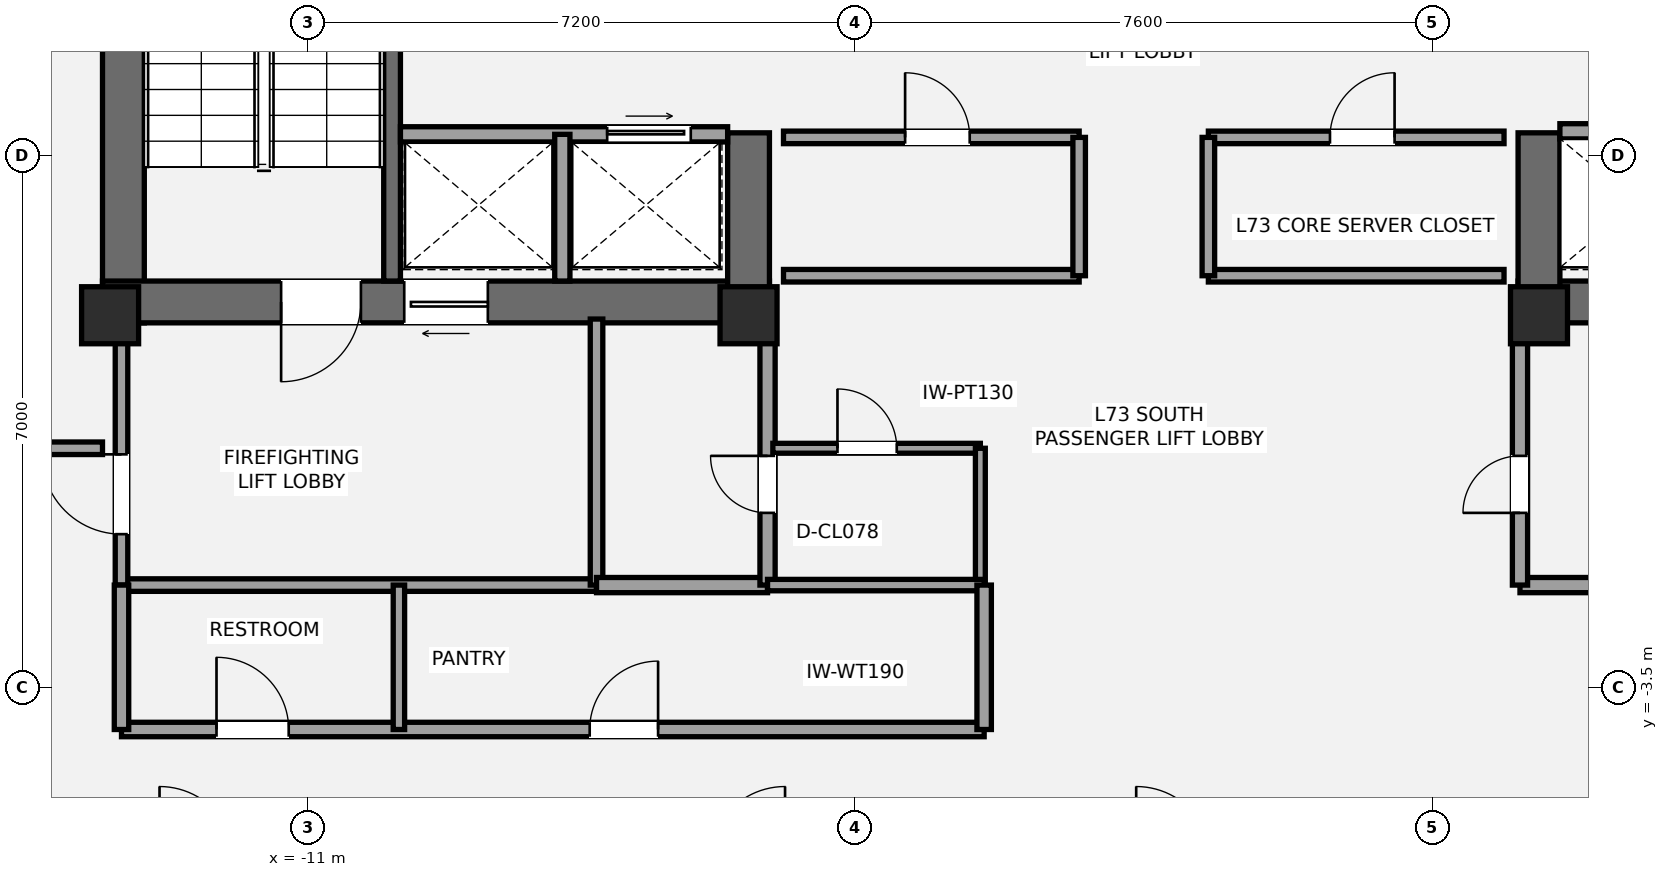
"""IFC4 building model, lengths in metres.
Left out: names, types, materials, properties, quantities, classifications, styles, units other than length and angle.
Written with IfcOpenShell. Run it as: python <this file> out.ifc"""

import sys

from ifc_helpers import new_model, si_unit, direction, frame, frame_2d, origin, origin_2d, place, context, subcontext, project, spatial, rectangle, extrude, element, fill, save


model = new_model("IFC4")
c1 = context("Model", 3, precision=1e-05, world=origin(), true_north=direction((0.0, 1.0)))
c2 = subcontext(c1, "Body", "Model", "MODEL_VIEW")
j1 = project(units=[si_unit("LENGTHUNIT", "METRE"), si_unit("PLANEANGLEUNIT", "RADIAN")], contexts=[c1])
p1 = place(None, origin())
s1 = spatial("IfcSite", under=j1, at=p1, CompositionType="ELEMENT")
p2 = place(p1, origin())
s2 = spatial("IfcBuilding", under=s1, at=p2, CompositionType="ELEMENT")
p3 = place(p2, frame((0.0, 0.0, 257.25)))
s3 = spatial("IfcBuildingStorey", under=s2, at=p3, CompositionType="ELEMENT", Elevation=257.25)
p4 = place(p3, frame((-13.425, 1.3, 0.0), z_axis=(0.0, 0.0, 1.0), x_axis=(0.0, 1.0, 0.0)))
e1 = element("IfcWall", 1, at=p4, inside=s3, PredefinedType="SHEAR", context=c2, shape_type="SweptSolid", body=[
    extrude(rectangle(XDim=8.25, YDim=0.55, at=frame_2d((4.125, 0.0))), origin(), (0.0, 0.0, 1.0), 3.15),
])
p5 = place(p3, frame((-4.925, 1.575, 0.0), z_axis=(0.0, 0.0, 1.0), x_axis=(-1.0, 0.0, 0.0)))
e2 = element("IfcWall", 2, at=p5, inside=s3, PredefinedType="SHEAR", context=c2, shape_type="SweptSolid", body=[
    extrude(rectangle(XDim=8.775, YDim=0.55, at=frame_2d((4.387, 0.0))), origin(), (0.0, 0.0, 1.0), 3.15),
])
p6 = place(p5, frame((5.375, 0.0, 0.0)))
e3 = element("IfcOpeningElement", 3, at=p6, cuts=e2, PredefinedType="OPENING", context=c2, shape_type="SweptSolid", body=[
    extrude(rectangle(XDim=1.05, YDim=2.15, at=frame_2d((0.525, 1.075))), frame((0.0, 0.285, 0.0), z_axis=(0.0, -1.0, 0.0), x_axis=(1.0, 0.0, 0.0)), (0.0, 0.0, 1.0), 0.57),
])
p7 = place(p5, frame((3.705, 0.0, 0.0)))
e4 = element("IfcOpeningElement", 4, at=p7, cuts=e2, PredefinedType="OPENING", context=c2, shape_type="SweptSolid", body=[
    extrude(rectangle(XDim=1.1, YDim=2.2, at=frame_2d((0.55, 1.1))), frame((0.0, 0.285, 0.0), z_axis=(0.0, -1.0, 0.0), x_axis=(1.0, 0.0, 0.0)), (0.0, 0.0, 1.0), 0.57),
])
p8 = place(p3, frame((-5.2, 1.3, 0.0), z_axis=(0.0, 0.0, 1.0), x_axis=(0.0, 1.0, 0.0)))
e5 = element("IfcWall", 5, at=p8, inside=s3, PredefinedType="SHEAR", context=c2, shape_type="SweptSolid", body=[
    extrude(rectangle(XDim=2.5, YDim=0.55, at=frame_2d((1.25, 0.0))), origin(), (0.0, 0.0, 1.0), 3.15),
])
p9 = place(p3, frame((-9.89, 1.85, 0.0), z_axis=(0.0, 0.0, 1.0), x_axis=(0.0, 1.0, 0.0)))
e6 = element("IfcWall", 6, at=p9, inside=s3, PredefinedType="SHEAR", context=c2, shape_type="SweptSolid", body=[
    extrude(rectangle(XDim=7.15, YDim=0.22, at=frame_2d((3.575, 0.0))), origin(), (0.0, 0.0, 1.0), 3.15),
])
p10 = place(p3, frame((13.7, 1.575, 0.0), z_axis=(0.0, 0.0, 1.0), x_axis=(-1.0, 0.0, 0.0)))
e7 = element("IfcWall", 7, at=p10, inside=s3, PredefinedType="SHEAR", context=c2, shape_type="SweptSolid", body=[
    extrude(rectangle(XDim=8.775, YDim=0.55, at=frame_2d((4.387, 0.0))), origin(), (0.0, 0.0, 1.0), 3.15),
])
p11 = place(p10, frame((2.35, 0.0, 0.0)))
e8 = element("IfcOpeningElement", 8, at=p11, cuts=e7, PredefinedType="OPENING", context=c2, shape_type="SweptSolid", body=[
    extrude(rectangle(XDim=1.05, YDim=2.15, at=frame_2d((0.525, 1.075))), frame((0.0, 0.285, 0.0), z_axis=(0.0, -1.0, 0.0), x_axis=(1.0, 0.0, 0.0)), (0.0, 0.0, 1.0), 0.57),
])
p12 = place(p10, frame((4.35, 0.0, 0.0)))
e9 = element("IfcOpeningElement", 9, at=p12, cuts=e7, PredefinedType="OPENING", context=c2, shape_type="SweptSolid", body=[
    extrude(rectangle(XDim=1.1, YDim=2.2, at=frame_2d((0.55, 1.1))), frame((0.0, 0.285, 0.0), z_axis=(0.0, -1.0, 0.0), x_axis=(1.0, 0.0, 0.0)), (0.0, 0.0, 1.0), 0.57),
])
p13 = place(p3, frame((5.2, 1.3, 0.0), z_axis=(0.0, 0.0, 1.0), x_axis=(0.0, 1.0, 0.0)))
e10 = element("IfcWall", 10, at=p13, inside=s3, PredefinedType="SHEAR", context=c2, shape_type="SweptSolid", body=[
    extrude(rectangle(XDim=2.5, YDim=0.55, at=frame_2d((1.25, 0.0))), origin(), (0.0, 0.0, 1.0), 3.15),
])
for number, where, z_axis, x_axis in (
    (11, (-13.6, 1.4, 0.0), (0.0, 0.0, 1.0), (1.0, 0.0, 0.0)),
    (12, (-5.2, 1.4, 0.0), (0.0, 0.0, 1.0), (1.0, 0.0, 0.0)),
    (13, (5.2, 1.4, 0.0), (0.0, 0.0, 1.0), (1.0, 0.0, 0.0)),
):
    element("IfcColumn", number, at=place(p3, frame(where, z_axis=z_axis, x_axis=x_axis)), inside=s3, PredefinedType="PILASTER", context=c2, shape_type="SweptSolid", body=[
        extrude(rectangle(XDim=0.75, YDim=0.75, at=origin_2d()), origin(), (0.0, 0.0, 1.0), 3.15),
    ])
p14 = place(p3, frame((-13.45, -2.15, 0.0), z_axis=(0.0, 0.0, 1.0), x_axis=(1.0, 0.0, 0.0)))
e14 = element("IfcWall", 14, at=p14, inside=s3, PredefinedType="PARTITIONING", context=c2, shape_type="SweptSolid", body=[
    extrude(rectangle(XDim=6.25, YDim=0.165, at=frame_2d((3.125, 0.0))), origin(), (0.0, 0.0, 1.0), 2.383),
])
p15 = place(p3, frame((-13.45, -2.15, 0.0), z_axis=(0.0, 0.0, 1.0), x_axis=(0.0, 1.0, 0.0)))
e15 = element("IfcWall", 15, at=p15, inside=s3, PredefinedType="PARTITIONING", context=c2, shape_type="SweptSolid", body=[
    extrude(rectangle(XDim=3.5, YDim=0.165, at=frame_2d((1.75, 0.0))), origin(), (0.0, 0.0, 1.0), 2.383),
])
p16 = place(p15, frame((0.67, 0.0, 0.0)))
e16 = element("IfcOpeningElement", 16, at=p16, cuts=e15, PredefinedType="OPENING", context=c2, shape_type="SweptSolid", body=[
    extrude(rectangle(XDim=1.05, YDim=2.15, at=frame_2d((0.525, 1.075))), frame((0.0, 0.093, 0.0), z_axis=(0.0, -1.0, 0.0), x_axis=(1.0, 0.0, 0.0)), (0.0, 0.0, 1.0), 0.185),
])
p17 = place(p3, frame((-7.2, -2.15, 0.0), z_axis=(0.0, 0.0, 1.0), x_axis=(0.0, 1.0, 0.0)))
e17 = element("IfcWall", 17, at=p17, inside=s3, PredefinedType="PARTITIONING", context=c2, shape_type="SweptSolid", body=[
    extrude(rectangle(XDim=3.5, YDim=0.165, at=frame_2d((1.75, 0.0))), origin(), (0.0, 0.0, 1.0), 2.383),
])
p18 = place(p3, frame((-7.2, -2.15, 0.0), z_axis=(0.0, 0.0, 1.0), x_axis=(1.0, 0.0, 0.0)))
e18 = element("IfcWall", 18, at=p18, inside=s3, PredefinedType="SOLIDWALL", context=c2, shape_type="SweptSolid", body=[
    extrude(rectangle(XDim=2.25, YDim=0.2, at=frame_2d((1.125, 0.0))), origin(), (0.0, 0.0, 1.0), 2.93),
])
p19 = place(p3, frame((-4.95, -2.15, 0.0), z_axis=(0.0, 0.0, 1.0), x_axis=(0.0, 1.0, 0.0)))
e19 = element("IfcWall", 19, at=p19, inside=s3, PredefinedType="SOLIDWALL", context=c2, shape_type="SweptSolid", body=[
    extrude(rectangle(XDim=3.5, YDim=0.2, at=frame_2d((1.75, 0.0))), origin(), (0.0, 0.0, 1.0), 2.383),
])
p20 = place(p19, frame((0.95, 0.0, 0.0)))
e20 = element("IfcOpeningElement", 20, at=p20, cuts=e19, PredefinedType="OPENING", context=c2, shape_type="SweptSolid", body=[
    extrude(rectangle(XDim=0.75, YDim=2.1, at=frame_2d((0.375, 1.05))), frame((0.0, 0.11, 0.0), z_axis=(0.0, -1.0, 0.0), x_axis=(1.0, 0.0, 0.0)), (0.0, 0.0, 1.0), 0.22),
])
p21 = place(p3, frame((4.95, -2.15, 0.0), z_axis=(0.0, 0.0, 1.0), x_axis=(1.0, 0.0, 0.0)))
e21 = element("IfcWall", 21, at=p21, inside=s3, PredefinedType="SOLIDWALL", context=c2, shape_type="SweptSolid", body=[
    extrude(rectangle(XDim=2.25, YDim=0.2, at=frame_2d((1.125, 0.0))), origin(), (0.0, 0.0, 1.0), 2.93),
])
p22 = place(p3, frame((4.95, -2.15, 0.0), z_axis=(0.0, 0.0, 1.0), x_axis=(0.0, 1.0, 0.0)))
e22 = element("IfcWall", 22, at=p22, inside=s3, PredefinedType="SOLIDWALL", context=c2, shape_type="SweptSolid", body=[
    extrude(rectangle(XDim=3.5, YDim=0.2, at=frame_2d((1.75, 0.0))), origin(), (0.0, 0.0, 1.0), 2.383),
])
p23 = place(p22, frame((0.95, 0.0, 0.0)))
e23 = element("IfcOpeningElement", 23, at=p23, cuts=e22, PredefinedType="OPENING", context=c2, shape_type="SweptSolid", body=[
    extrude(rectangle(XDim=0.75, YDim=2.1, at=frame_2d((0.375, 1.05))), frame((0.0, 0.11, 0.0), z_axis=(0.0, -1.0, 0.0), x_axis=(1.0, 0.0, 0.0)), (0.0, 0.0, 1.0), 0.22),
])
p24 = place(p3, frame((-4.88, -0.35, 0.0), z_axis=(0.0, 0.0, 1.0), x_axis=(1.0, 0.0, 0.0)))
e24 = element("IfcWall", 24, at=p24, inside=s3, PredefinedType="PARTITIONING", context=c2, shape_type="SweptSolid", body=[
    extrude(rectangle(XDim=2.73, YDim=0.13, at=frame_2d((1.365, 0.0))), origin(), (0.0, 0.0, 1.0), 2.383),
])
p25 = place(p24, frame((0.85, 0.0, 0.0)))
e25 = element("IfcOpeningElement", 25, at=p25, cuts=e24, PredefinedType="OPENING", context=c2, shape_type="SweptSolid", body=[
    extrude(rectangle(XDim=0.78, YDim=2.1, at=frame_2d((0.39, 1.05))), frame((0.0, 0.075, 0.0), z_axis=(0.0, -1.0, 0.0), x_axis=(1.0, 0.0, 0.0)), (0.0, 0.0, 1.0), 0.15),
])
p26 = place(p3, frame((-2.15, -2.15, 0.0), z_axis=(0.0, 0.0, 1.0), x_axis=(0.0, 1.0, 0.0)))
e26 = element("IfcWall", 26, at=p26, inside=s3, PredefinedType="PARTITIONING", context=c2, shape_type="SweptSolid", body=[
    extrude(rectangle(XDim=1.8, YDim=0.13, at=frame_2d((0.9, 0.0))), origin(), (0.0, 0.0, 1.0), 2.93),
])
p27 = place(p3, frame((-9.78, 3.78, 0.0), z_axis=(0.0, 0.0, 1.0), x_axis=(1.0, 0.0, 0.0)))
e27 = element("IfcWall", 27, at=p27, inside=s3, PredefinedType="SOLIDWALL", context=c2, shape_type="SweptSolid", body=[
    extrude(rectangle(XDim=4.305, YDim=0.2, at=frame_2d((2.152, 0.0))), origin(), (0.0, 0.0, 1.0), 2.93),
])
p28 = place(p27, frame((2.72, 0.0, 0.0)))
e28 = element("IfcOpeningElement", 28, at=p28, cuts=e27, PredefinedType="OPENING", context=c2, shape_type="SweptSolid", body=[
    extrude(rectangle(XDim=1.1, YDim=2.2, at=frame_2d((0.55, 1.1))), frame((0.0, 0.11, 0.0), z_axis=(0.0, -1.0, 0.0), x_axis=(1.0, 0.0, 0.0)), (0.0, 0.0, 1.0), 0.22),
])
p29 = place(p3, frame((-7.65, 1.85, 0.0), z_axis=(0.0, 0.0, 1.0), x_axis=(0.0, 1.0, 0.0)))
e29 = element("IfcWall", 29, at=p29, inside=s3, PredefinedType="SOLIDWALL", context=c2, shape_type="SweptSolid", body=[
    extrude(rectangle(XDim=1.93, YDim=0.2, at=frame_2d((0.965, 0.0))), origin(), (0.0, 0.0, 1.0), 2.93),
])
p30 = place(p3, frame((5.475, 3.82, 0.0), z_axis=(0.0, 0.0, 1.0), x_axis=(1.0, 0.0, 0.0)))
e30 = element("IfcWall", 30, at=p30, inside=s3, PredefinedType="SOLIDWALL", context=c2, shape_type="SweptSolid", body=[
    extrude(rectangle(XDim=4.305, YDim=0.2, at=frame_2d((2.152, 0.0))), origin(), (0.0, 0.0, 1.0), 2.93),
])
p31 = place(p30, frame((0.65, 0.0, 0.0)))
e31 = element("IfcOpeningElement", 31, at=p31, cuts=e30, PredefinedType="OPENING", context=c2, shape_type="SweptSolid", body=[
    extrude(rectangle(XDim=1.2, YDim=2.2, at=frame_2d((0.6, 1.1))), frame((0.0, 0.11, 0.0), z_axis=(0.0, -1.0, 0.0), x_axis=(1.0, 0.0, 0.0)), (0.0, 0.0, 1.0), 0.22),
])
p32 = place(p3, frame((-4.74, 1.92, 0.0), z_axis=(0.0, 0.0, 1.0), x_axis=(1.0, 0.0, 0.0)))
e32 = element("IfcWall", 32, at=p32, inside=s3, PredefinedType="PARTITIONING", context=c2, shape_type="SweptSolid", body=[
    extrude(rectangle(XDim=3.89, YDim=0.165, at=frame_2d((1.945, 0.0))), origin(), (0.0, 0.0, 1.0), 2.07),
])
p33 = place(p3, frame((-4.74, 3.74, 0.0), z_axis=(0.0, 0.0, 1.0), x_axis=(1.0, 0.0, 0.0)))
e33 = element("IfcWall", 33, at=p33, inside=s3, PredefinedType="PARTITIONING", context=c2, shape_type="SweptSolid", body=[
    extrude(rectangle(XDim=3.89, YDim=0.165, at=frame_2d((1.945, 0.0))), origin(), (0.0, 0.0, 1.0), 2.93),
])
p34 = place(p33, frame((1.6, 0.0, 0.0)))
e34 = element("IfcOpeningElement", 34, at=p34, cuts=e33, PredefinedType="OPENING", context=c2, shape_type="SweptSolid", body=[
    extrude(rectangle(XDim=0.85, YDim=2.1, at=frame_2d((0.425, 1.05))), frame((0.0, 0.093, 0.0), z_axis=(0.0, -1.0, 0.0), x_axis=(1.0, 0.0, 0.0)), (0.0, 0.0, 1.0), 0.185),
])
p35 = place(p3, frame((-0.85, 1.92, 0.0), z_axis=(0.0, 0.0, 1.0), x_axis=(0.0, 1.0, 0.0)))
e35 = element("IfcWall", 35, at=p35, inside=s3, PredefinedType="PARTITIONING", context=c2, shape_type="SweptSolid", body=[
    extrude(rectangle(XDim=1.82, YDim=0.165, at=frame_2d((0.91, 0.0))), origin(), (0.0, 0.0, 1.0), 2.93),
])
p36 = place(p3, frame((0.85, 1.92, 0.0), z_axis=(0.0, 0.0, 1.0), x_axis=(1.0, 0.0, 0.0)))
e36 = element("IfcWall", 36, at=p36, inside=s3, PredefinedType="PARTITIONING", context=c2, shape_type="SweptSolid", body=[
    extrude(rectangle(XDim=3.89, YDim=0.165, at=frame_2d((1.945, 0.0))), origin(), (0.0, 0.0, 1.0), 2.07),
])
p37 = place(p3, frame((0.85, 3.74, 0.0), z_axis=(0.0, 0.0, 1.0), x_axis=(1.0, 0.0, 0.0)))
e37 = element("IfcWall", 37, at=p37, inside=s3, PredefinedType="PARTITIONING", context=c2, shape_type="SweptSolid", body=[
    extrude(rectangle(XDim=3.89, YDim=0.165, at=frame_2d((1.945, 0.0))), origin(), (0.0, 0.0, 1.0), 2.93),
])
p38 = place(p37, frame((1.6, 0.0, 0.0)))
e38 = element("IfcOpeningElement", 38, at=p38, cuts=e37, PredefinedType="OPENING", context=c2, shape_type="SweptSolid", body=[
    extrude(rectangle(XDim=0.85, YDim=2.1, at=frame_2d((0.425, 1.05))), frame((0.0, 0.093, 0.0), z_axis=(0.0, -1.0, 0.0), x_axis=(1.0, 0.0, 0.0)), (0.0, 0.0, 1.0), 0.185),
])
p39 = place(p3, frame((0.85, 1.92, 0.0), z_axis=(0.0, 0.0, 1.0), x_axis=(0.0, 1.0, 0.0)))
e39 = element("IfcWall", 39, at=p39, inside=s3, PredefinedType="PARTITIONING", context=c2, shape_type="SweptSolid", body=[
    extrude(rectangle(XDim=1.82, YDim=0.165, at=frame_2d((0.91, 0.0))), origin(), (0.0, 0.0, 1.0), 2.93),
])
p40 = place(p3, frame((-13.45, -4.05, 0.0), z_axis=(0.0, 0.0, 1.0), x_axis=(1.0, 0.0, 0.0)))
e40 = element("IfcWall", 40, at=p40, inside=s3, PredefinedType="PLUMBINGWALL", context=c2, shape_type="SweptSolid", body=[
    extrude(rectangle(XDim=11.35, YDim=0.19, at=frame_2d((5.675, 0.0))), origin(), (0.0, 0.0, 1.0), 2.317),
])
p41 = place(p40, frame((1.25, 0.0, 0.0)))
e41 = element("IfcOpeningElement", 41, at=p41, cuts=e40, PredefinedType="OPENING", context=c2, shape_type="SweptSolid", body=[
    extrude(rectangle(XDim=0.95, YDim=2.15, at=frame_2d((0.475, 1.075))), frame((0.0, 0.105, 0.0), z_axis=(0.0, -1.0, 0.0), x_axis=(1.0, 0.0, 0.0)), (0.0, 0.0, 1.0), 0.21),
])
p42 = place(p40, frame((6.16, 0.0, 0.0)))
e42 = element("IfcOpeningElement", 42, at=p42, cuts=e40, PredefinedType="OPENING", context=c2, shape_type="SweptSolid", body=[
    extrude(rectangle(XDim=0.9, YDim=2.1, at=frame_2d((0.45, 1.05))), frame((0.0, 0.105, 0.0), z_axis=(0.0, -1.0, 0.0), x_axis=(1.0, 0.0, 0.0)), (0.0, 0.0, 1.0), 0.21),
])
p43 = place(p3, frame((-4.95, -2.15, 0.0), z_axis=(0.0, 0.0, 1.0), x_axis=(1.0, 0.0, 0.0)))
e43 = element("IfcWall", 43, at=p43, inside=s3, PredefinedType="PLUMBINGWALL", context=c2, shape_type="SweptSolid", body=[
    extrude(rectangle(XDim=2.85, YDim=0.15, at=frame_2d((1.425, 0.0))), origin(), (0.0, 0.0, 1.0), 2.383),
])
for number, where, z_axis, x_axis in (
    (44, (-13.45, -4.05, 0.0), (0.0, 0.0, 1.0), (0.0, 1.0, 0.0)),
    (45, (-2.1, -4.05, 0.0), (0.0, 0.0, 1.0), (0.0, 1.0, 0.0)),
):
    element("IfcWall", number, at=place(p3, frame(where, z_axis=z_axis, x_axis=x_axis)), inside=s3, PredefinedType="PLUMBINGWALL", context=c2, shape_type="SweptSolid", body=[
        extrude(rectangle(XDim=1.9, YDim=0.19, at=frame_2d((0.95, 0.0))), origin(), (0.0, 0.0, 1.0), 2.383),
    ])
p44 = place(p3, frame((-9.8, -4.05, 0.0), z_axis=(0.0, 0.0, 1.0), x_axis=(0.0, 1.0, 0.0)))
e46 = element("IfcWall", 46, at=p44, inside=s3, PredefinedType="PLUMBINGWALL", context=c2, shape_type="SweptSolid", body=[
    extrude(rectangle(XDim=1.9, YDim=0.15, at=frame_2d((0.95, 0.0))), origin(), (0.0, 0.0, 1.0), 2.93),
])
p45 = place(p3, frame((-16.1, -0.35, 0.0), z_axis=(0.0, 0.0, 1.0), x_axis=(1.0, 0.0, 0.0)))
e47 = element("IfcWall", 47, at=p45, inside=s3, PredefinedType="PARTITIONING", context=c2, shape_type="SweptSolid", body=[
    extrude(rectangle(XDim=2.4, YDim=0.165, at=frame_2d((1.2, 0.0))), origin(), (0.0, 0.0, 1.0), 2.383),
])
p46 = place(p6, origin())
e48 = element("IfcDoor", 48, at=p46, inside=s3, OperationType="SINGLE_SWING_RIGHT", PredefinedType="DOOR", context=c2, shape_type="SweptSolid", body=[
    extrude(rectangle(XDim=1.05, YDim=2.15, at=frame_2d((0.525, 1.075))), frame((0.0, 0.025, 0.0), z_axis=(0.0, -1.0, 0.0), x_axis=(1.0, 0.0, 0.0)), (0.0, 0.0, 1.0), 0.05),
])
fill(e3, e48)
p47 = place(p16, origin())
e49 = element("IfcDoor", 49, at=p47, inside=s3, OperationType="SINGLE_SWING_RIGHT", PredefinedType="DOOR", context=c2, shape_type="SweptSolid", body=[
    extrude(rectangle(XDim=1.05, YDim=2.15, at=frame_2d((0.525, 1.075))), frame((0.0, 0.025, 0.0), z_axis=(0.0, -1.0, 0.0), x_axis=(1.0, 0.0, 0.0)), (0.0, 0.0, 1.0), 0.05),
])
fill(e16, e49)
p48 = place(p20, origin())
e50 = element("IfcDoor", 50, at=p48, inside=s3, OperationType="SINGLE_SWING_RIGHT", PredefinedType="DOOR", context=c2, shape_type="SweptSolid", body=[
    extrude(rectangle(XDim=0.75, YDim=2.1, at=frame_2d((0.375, 1.05))), frame((0.0, 0.025, 0.0), z_axis=(0.0, -1.0, 0.0), x_axis=(1.0, 0.0, 0.0)), (0.0, 0.0, 1.0), 0.05),
])
fill(e20, e50)
p49 = place(p23, origin())
e51 = element("IfcDoor", 51, at=p49, inside=s3, OperationType="SINGLE_SWING_LEFT", PredefinedType="DOOR", context=c2, shape_type="SweptSolid", body=[
    extrude(rectangle(XDim=0.75, YDim=2.1, at=frame_2d((0.375, 1.05))), frame((0.0, 0.025, 0.0), z_axis=(0.0, -1.0, 0.0), x_axis=(1.0, 0.0, 0.0)), (0.0, 0.0, 1.0), 0.05),
])
fill(e23, e51)
p50 = place(p25, origin())
e52 = element("IfcDoor", 52, at=p50, inside=s3, OperationType="SINGLE_SWING_LEFT", PredefinedType="DOOR", context=c2, shape_type="SweptSolid", body=[
    extrude(rectangle(XDim=0.78, YDim=2.1, at=frame_2d((0.39, 1.05))), frame((0.0, 0.025, 0.0), z_axis=(0.0, -1.0, 0.0), x_axis=(1.0, 0.0, 0.0)), (0.0, 0.0, 1.0), 0.05),
])
fill(e25, e52)
p51 = place(p7, origin())
e53 = element("IfcDoor", 53, at=p51, inside=s3, OperationType="SLIDING_TO_LEFT", PredefinedType="DOOR", context=c2, shape_type="SweptSolid", body=[
    extrude(rectangle(XDim=1.1, YDim=2.2, at=frame_2d((0.55, 1.1))), frame((0.0, 0.025, 0.0), z_axis=(0.0, -1.0, 0.0), x_axis=(1.0, 0.0, 0.0)), (0.0, 0.0, 1.0), 0.05),
])
fill(e4, e53)
p52 = place(p28, origin())
e54 = element("IfcDoor", 54, at=p52, inside=s3, OperationType="SLIDING_TO_LEFT", PredefinedType="DOOR", context=c2, shape_type="SweptSolid", body=[
    extrude(rectangle(XDim=1.1, YDim=2.2, at=frame_2d((0.55, 1.1))), frame((0.0, 0.025, 0.0), z_axis=(0.0, -1.0, 0.0), x_axis=(1.0, 0.0, 0.0)), (0.0, 0.0, 1.0), 0.05),
])
fill(e28, e54)
p53 = place(p34, origin())
e55 = element("IfcDoor", 55, at=p53, inside=s3, OperationType="SINGLE_SWING_LEFT", PredefinedType="DOOR", context=c2, shape_type="SweptSolid", body=[
    extrude(rectangle(XDim=0.85, YDim=2.1, at=frame_2d((0.425, 1.05))), frame((0.0, 0.025, 0.0), z_axis=(0.0, -1.0, 0.0), x_axis=(1.0, 0.0, 0.0)), (0.0, 0.0, 1.0), 0.05),
])
fill(e34, e55)
p54 = place(p38, origin())
e56 = element("IfcDoor", 56, at=p54, inside=s3, OperationType="SINGLE_SWING_RIGHT", PredefinedType="DOOR", context=c2, shape_type="SweptSolid", body=[
    extrude(rectangle(XDim=0.85, YDim=2.1, at=frame_2d((0.425, 1.05))), frame((0.0, 0.025, 0.0), z_axis=(0.0, -1.0, 0.0), x_axis=(1.0, 0.0, 0.0)), (0.0, 0.0, 1.0), 0.05),
])
fill(e38, e56)
p55 = place(p41, origin())
e57 = element("IfcDoor", 57, at=p55, inside=s3, OperationType="SINGLE_SWING_LEFT", PredefinedType="DOOR", context=c2, shape_type="SweptSolid", body=[
    extrude(rectangle(XDim=0.95, YDim=2.15, at=frame_2d((0.475, 1.075))), frame((0.0, 0.025, 0.0), z_axis=(0.0, -1.0, 0.0), x_axis=(1.0, 0.0, 0.0)), (0.0, 0.0, 1.0), 0.05),
])
fill(e41, e57)
p56 = place(p42, origin())
e58 = element("IfcDoor", 58, at=p56, inside=s3, OperationType="SINGLE_SWING_RIGHT", PredefinedType="DOOR", context=c2, shape_type="SweptSolid", body=[
    extrude(rectangle(XDim=0.9, YDim=2.1, at=frame_2d((0.45, 1.05))), frame((0.0, 0.025, 0.0), z_axis=(0.0, -1.0, 0.0), x_axis=(1.0, 0.0, 0.0)), (0.0, 0.0, 1.0), 0.05),
])
fill(e42, e58)
save(model, sys.argv[1])
